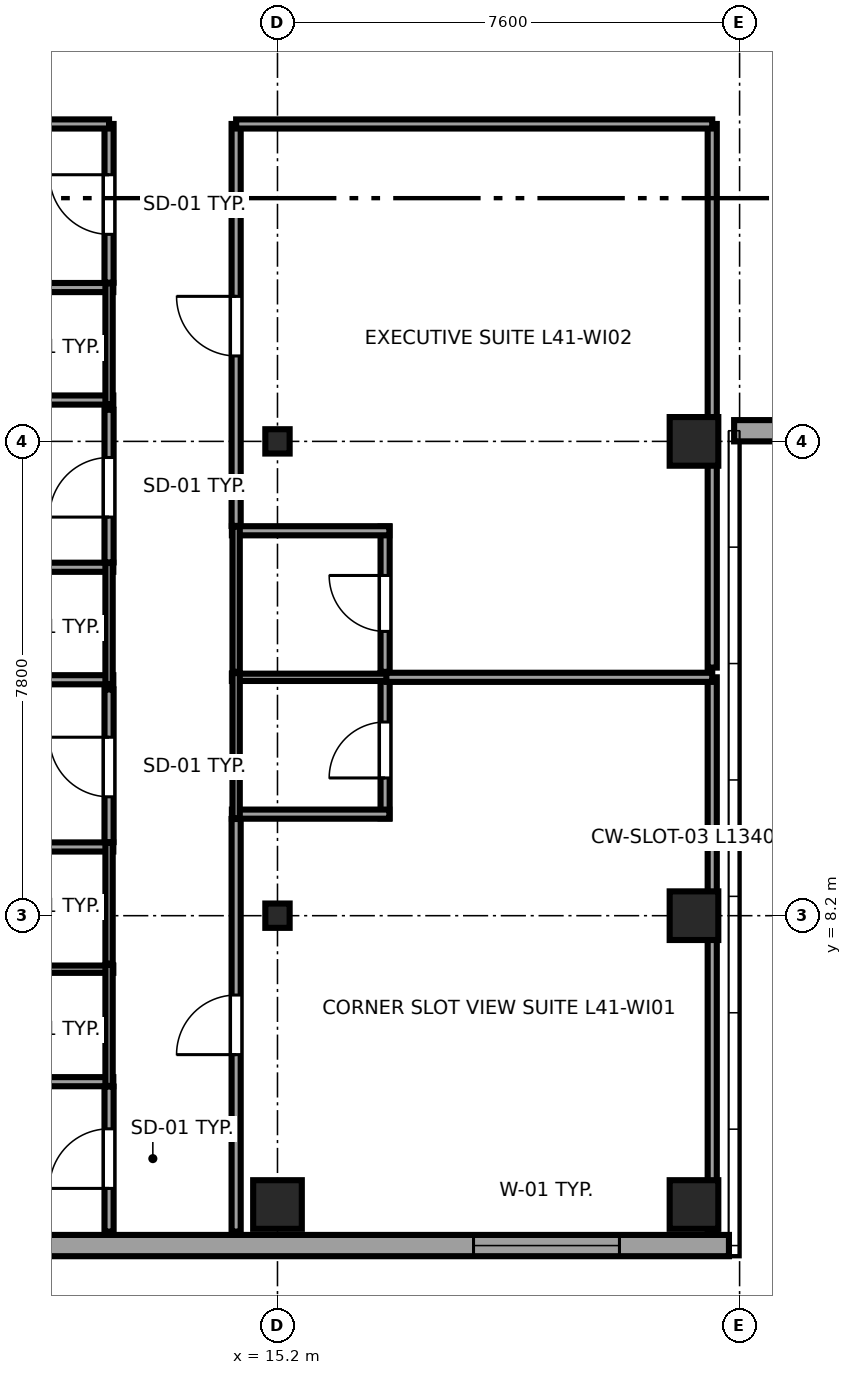
"""IFC4 building model, lengths in metres.
Left out: names, types, materials, properties, quantities, classifications, styles, units other than length and angle.
Written with IfcOpenShell. Run it as: python <this file> out.ifc"""

import sys

from ifc_helpers import new_model, si_unit, direction, frame, frame_2d, origin, origin_2d, place, context, subcontext, project, spatial, rectangle, i_section, extrude, source, transform, mapped, element, fill, save


model = new_model("IFC4")
c1 = context("Model", 3, precision=1e-05, world=origin(), true_north=direction((0.0, 1.0)))
c2 = subcontext(c1, "Body", "Model", "MODEL_VIEW")
j1 = project(units=[si_unit("LENGTHUNIT", "METRE"), si_unit("PLANEANGLEUNIT", "RADIAN")], contexts=[c1])
p1 = place(None, origin())
s1 = spatial("IfcSite", under=j1, at=p1, CompositionType="ELEMENT")
p2 = place(p1, origin())
s2 = spatial("IfcBuilding", under=s1, at=p2, CompositionType="ELEMENT")
p3 = place(p2, frame((0.0, 0.0, 157.7)))
s3 = spatial("IfcBuildingStorey", under=s2, at=p3, CompositionType="ELEMENT", Elevation=157.7)
m1 = source(origin(), c2, "Body", "SweptSolid", [
    extrude(rectangle(XDim=0.8, YDim=0.8, at=origin_2d()), origin(), (0.0, 0.0, 1.0), 3.55),
])
p4 = place(p3, frame((15.2, 3.45, 0.0), z_axis=(0.0, 0.0, 1.0), x_axis=(1.0, 0.0, 0.0)))
e1 = element("IfcColumn", 1, at=p4, inside=s3, PredefinedType="COLUMN", context=c2, shape_type="MappedRepresentation", body=[
    mapped(m1, transform((0.0, 0.0, 0.0), x_axis=(1.0, 0.0, 0.0), y_axis=(0.0, 1.0, 0.0), z_axis=(0.0, 0.0, 1.0), scale=1.0)),
])
m2 = source(origin(), c2, "Body", "SweptSolid", [
    extrude(i_section(OverallWidth=0.4, OverallDepth=0.4, WebThickness=0.02, FlangeThickness=0.035, at=origin_2d()), origin(), (0.0, 0.0, 1.0), 3.55),
])
for number, where, z_axis, x_axis in (
    (2, (15.2, 8.2, 0.0), (0.0, 0.0, 1.0), (1.0, 0.0, 0.0)),
    (3, (15.2, 16.0, 0.0), (0.0, 0.0, 1.0), (1.0, 0.0, 0.0)),
):
    element("IfcColumn", number, at=place(p3, frame(where, z_axis=z_axis, x_axis=x_axis)), inside=s3, PredefinedType="COLUMN", context=c2, shape_type="MappedRepresentation", body=[
        mapped(m2, transform((0.0, 0.0, 0.0), x_axis=(1.0, 0.0, 0.0), y_axis=(0.0, 1.0, 0.0), z_axis=(0.0, 0.0, 1.0), scale=1.0)),
    ])
for number, where, z_axis, x_axis in (
    (4, (22.05, 3.45, 0.0), (0.0, 0.0, 1.0), (1.0, 0.0, 0.0)),
    (5, (22.05, 8.2, 0.0), (0.0, 0.0, 1.0), (1.0, 0.0, 0.0)),
    (6, (22.05, 16.0, 0.0), (0.0, 0.0, 1.0), (1.0, 0.0, 0.0)),
):
    element("IfcColumn", number, at=place(p3, frame(where, z_axis=z_axis, x_axis=x_axis)), inside=s3, PredefinedType="COLUMN", context=c2, shape_type="MappedRepresentation", body=[
        mapped(m1, transform((0.0, 0.0, 0.0), x_axis=(1.0, 0.0, 0.0), y_axis=(0.0, 1.0, 0.0), z_axis=(0.0, 0.0, 1.0), scale=1.0)),
    ])
p5 = place(p3, frame((7.017, 2.775, 0.0), z_axis=(0.0, 0.0, 1.0), x_axis=(1.0, 0.0, 0.0)))
e7 = element("IfcWall", 7, at=p5, inside=s3, PredefinedType="SOLIDWALL", context=c2, shape_type="SweptSolid", body=[
    extrude(rectangle(XDim=15.608, YDim=0.35, at=frame_2d((7.804, 0.0))), origin(), (0.0, 0.0, 1.0), 3.37),
])
p6 = place(p5, frame((1.801, 0.0, 0.68)))
e8 = element("IfcOpeningElement", 8, at=p6, cuts=e7, PredefinedType="OPENING", context=c2, shape_type="SweptSolid", body=[
    extrude(rectangle(XDim=2.4, YDim=1.9, at=frame_2d((1.2, 0.95))), frame((0.0, 0.185, 0.0), z_axis=(0.0, -1.0, 0.0), x_axis=(1.0, 0.0, 0.0)), (0.0, 0.0, 1.0), 0.37),
])
p7 = place(p5, frame((11.407, 0.0, 0.68)))
e9 = element("IfcOpeningElement", 9, at=p7, cuts=e7, PredefinedType="OPENING", context=c2, shape_type="SweptSolid", body=[
    extrude(rectangle(XDim=2.4, YDim=1.9, at=frame_2d((1.2, 0.95))), frame((0.0, 0.185, 0.0), z_axis=(0.0, -1.0, 0.0), x_axis=(1.0, 0.0, 0.0)), (0.0, 0.0, 1.0), 0.37),
])
p8 = place(p3, frame((22.71, 16.175, 0.0), z_axis=(0.0, 0.0, 1.0), x_axis=(1.0, 0.0, 0.0)))
e10 = element("IfcWall", 10, at=p8, inside=s3, PredefinedType="SOLIDWALL", context=c2, shape_type="SweptSolid", body=[
    extrude(rectangle(XDim=11.58, YDim=0.35, at=frame_2d((5.79, 0.0))), origin(), (0.0, 0.0, 1.0), 2.758),
])
p9 = place(p8, frame((1.995, 0.0, 0.68)))
e11 = element("IfcOpeningElement", 11, at=p9, cuts=e10, PredefinedType="OPENING", context=c2, shape_type="SweptSolid", body=[
    extrude(rectangle(XDim=2.4, YDim=1.9, at=frame_2d((1.2, 0.95))), frame((0.0, 0.185, 0.0), z_axis=(0.0, -1.0, 0.0), x_axis=(1.0, 0.0, 0.0)), (0.0, 0.0, 1.0), 0.37),
])
p10 = place(p8, frame((7.185, 0.0, 0.68)))
e12 = element("IfcOpeningElement", 12, at=p10, cuts=e10, PredefinedType="OPENING", context=c2, shape_type="SweptSolid", body=[
    extrude(rectangle(XDim=2.4, YDim=1.9, at=frame_2d((1.2, 0.95))), frame((0.0, 0.185, 0.0), z_axis=(0.0, -1.0, 0.0), x_axis=(1.0, 0.0, 0.0)), (0.0, 0.0, 1.0), 0.37),
])
p11 = place(p3, frame((9.91, 5.47, 0.0), z_axis=(0.0, 0.0, 1.0), x_axis=(1.0, 0.0, 0.0)))
e13 = element("IfcWall", 13, at=p11, inside=s3, PredefinedType="PARTITIONING", context=c2, shape_type="SweptSolid", body=[
    extrude(rectangle(XDim=2.59, YDim=0.15, at=frame_2d((1.295, 0.0))), origin(), (0.0, 0.0, 1.0), 3.37),
])
p12 = place(p3, frame((9.91, 7.32, 0.0), z_axis=(0.0, 0.0, 1.0), x_axis=(1.0, 0.0, 0.0)))
e14 = element("IfcWall", 14, at=p12, inside=s3, PredefinedType="PLUMBINGWALL", context=c2, shape_type="SweptSolid", body=[
    extrude(rectangle(XDim=2.59, YDim=0.12, at=frame_2d((1.295, 0.0))), origin(), (0.0, 0.0, 1.0), 3.37),
])
p13 = place(p3, frame((12.43, 5.4, 0.0), z_axis=(0.0, 0.0, 1.0), x_axis=(0.0, 1.0, 0.0)))
e15 = element("IfcWall", 15, at=p13, inside=s3, PredefinedType="PLUMBINGWALL", context=c2, shape_type="SweptSolid", body=[
    extrude(rectangle(XDim=1.99, YDim=0.12, at=frame_2d((0.995, 0.0))), origin(), (0.0, 0.0, 1.0), 3.37),
])
p14 = place(p3, frame((9.91, 9.33, 0.0), z_axis=(0.0, 0.0, 1.0), x_axis=(1.0, 0.0, 0.0)))
e16 = element("IfcWall", 16, at=p14, inside=s3, PredefinedType="PARTITIONING", context=c2, shape_type="SweptSolid", body=[
    extrude(rectangle(XDim=2.59, YDim=0.15, at=frame_2d((1.295, 0.0))), origin(), (0.0, 0.0, 1.0), 3.37),
])
p15 = place(p3, frame((12.43, 7.41, 0.0), z_axis=(0.0, 0.0, 1.0), x_axis=(0.0, 1.0, 0.0)))
e17 = element("IfcWall", 17, at=p15, inside=s3, PredefinedType="PLUMBINGWALL", context=c2, shape_type="SweptSolid", body=[
    extrude(rectangle(XDim=1.99, YDim=0.12, at=frame_2d((0.995, 0.0))), origin(), (0.0, 0.0, 1.0), 3.37),
])
p16 = place(p3, frame((2.9, 12.08, 0.0), z_axis=(0.0, 0.0, 1.0), x_axis=(1.0, 0.0, 0.0)))
e18 = element("IfcWall", 18, at=p16, inside=s3, PredefinedType="PARTITIONING", context=c2, shape_type="SweptSolid", body=[
    extrude(rectangle(XDim=9.6, YDim=0.15, at=frame_2d((4.8, 0.0))), origin(), (0.0, 0.0, 1.0), 3.37),
])
p17 = place(p3, frame((9.91, 13.93, 0.0), z_axis=(0.0, 0.0, 1.0), x_axis=(1.0, 0.0, 0.0)))
e19 = element("IfcWall", 19, at=p17, inside=s3, PredefinedType="PARTITIONING", context=c2, shape_type="SweptSolid", body=[
    extrude(rectangle(XDim=2.59, YDim=0.15, at=frame_2d((1.295, 0.0))), origin(), (0.0, 0.0, 1.0), 3.37),
])
p18 = place(p3, frame((12.43, 12.01, 0.0), z_axis=(0.0, 0.0, 1.0), x_axis=(0.0, 1.0, 0.0)))
e20 = element("IfcWall", 20, at=p18, inside=s3, PredefinedType="PLUMBINGWALL", context=c2, shape_type="SweptSolid", body=[
    extrude(rectangle(XDim=1.99, YDim=0.12, at=frame_2d((0.995, 0.0))), origin(), (0.0, 0.0, 1.0), 3.37),
])
p19 = place(p3, frame((2.9, 16.68, 0.0), z_axis=(0.0, 0.0, 1.0), x_axis=(1.0, 0.0, 0.0)))
e21 = element("IfcWall", 21, at=p19, inside=s3, PredefinedType="PARTITIONING", context=c2, shape_type="SweptSolid", body=[
    extrude(rectangle(XDim=9.6, YDim=0.15, at=frame_2d((4.8, 0.0))), origin(), (0.0, 0.0, 1.0), 3.37),
])
p20 = place(p3, frame((9.91, 18.53, 0.0), z_axis=(0.0, 0.0, 1.0), x_axis=(1.0, 0.0, 0.0)))
e22 = element("IfcWall", 22, at=p20, inside=s3, PredefinedType="PARTITIONING", context=c2, shape_type="SweptSolid", body=[
    extrude(rectangle(XDim=2.59, YDim=0.15, at=frame_2d((1.295, 0.0))), origin(), (0.0, 0.0, 1.0), 3.37),
])
p21 = place(p3, frame((12.43, 16.61, 0.0), z_axis=(0.0, 0.0, 1.0), x_axis=(0.0, 1.0, 0.0)))
e23 = element("IfcWall", 23, at=p21, inside=s3, PredefinedType="PLUMBINGWALL", context=c2, shape_type="SweptSolid", body=[
    extrude(rectangle(XDim=1.99, YDim=0.12, at=frame_2d((0.995, 0.0))), origin(), (0.0, 0.0, 1.0), 3.37),
])
p22 = place(p3, frame((16.97, 9.8, 0.0), z_axis=(0.0, 0.0, 1.0), x_axis=(0.0, 1.0, 0.0)))
e24 = element("IfcWall", 24, at=p22, inside=s3, PredefinedType="PARTITIONING", context=c2, shape_type="SweptSolid", body=[
    extrude(rectangle(XDim=2.39, YDim=0.15, at=frame_2d((1.195, 0.0))), origin(), (0.0, 0.0, 1.0), 3.37),
])
p23 = place(p22, frame((0.665, 0.0, 0.0)))
e25 = element("IfcOpeningElement", 25, at=p23, cuts=e24, PredefinedType="OPENING", context=c2, shape_type="SweptSolid", body=[
    extrude(rectangle(XDim=0.92, YDim=2.01, at=frame_2d((0.46, 1.005))), frame((0.0, 0.085, 0.0), z_axis=(0.0, -1.0, 0.0), x_axis=(1.0, 0.0, 0.0)), (0.0, 0.0, 1.0), 0.17),
])
p24 = place(p3, frame((14.45, 9.87, 0.0), z_axis=(0.0, 0.0, 1.0), x_axis=(1.0, 0.0, 0.0)))
e26 = element("IfcWall", 26, at=p24, inside=s3, PredefinedType="PARTITIONING", context=c2, shape_type="SweptSolid", body=[
    extrude(rectangle(XDim=2.59, YDim=0.15, at=frame_2d((1.295, 0.0))), origin(), (0.0, 0.0, 1.0), 3.37),
])
p25 = place(p3, frame((14.45, 12.12, 0.0), z_axis=(0.0, 0.0, 1.0), x_axis=(1.0, 0.0, 0.0)))
e27 = element("IfcWall", 27, at=p25, inside=s3, PredefinedType="PLUMBINGWALL", context=c2, shape_type="SweptSolid", body=[
    extrude(rectangle(XDim=2.59, YDim=0.12, at=frame_2d((1.295, 0.0))), origin(), (0.0, 0.0, 1.0), 3.37),
])
p26 = place(p3, frame((14.52, 9.8, 0.0), z_axis=(0.0, 0.0, 1.0), x_axis=(0.0, 1.0, 0.0)))
e28 = element("IfcWall", 28, at=p26, inside=s3, PredefinedType="PLUMBINGWALL", context=c2, shape_type="SweptSolid", body=[
    extrude(rectangle(XDim=2.39, YDim=0.12, at=frame_2d((1.195, 0.0))), origin(), (0.0, 0.0, 1.0), 3.37),
])
p27 = place(p3, frame((16.97, 12.21, 0.0), z_axis=(0.0, 0.0, 1.0), x_axis=(0.0, 1.0, 0.0)))
e29 = element("IfcWall", 29, at=p27, inside=s3, PredefinedType="PARTITIONING", context=c2, shape_type="SweptSolid", body=[
    extrude(rectangle(XDim=2.39, YDim=0.15, at=frame_2d((1.195, 0.0))), origin(), (0.0, 0.0, 1.0), 3.37),
])
p28 = place(p27, frame((0.665, 0.0, 0.0)))
e30 = element("IfcOpeningElement", 30, at=p28, cuts=e29, PredefinedType="OPENING", context=c2, shape_type="SweptSolid", body=[
    extrude(rectangle(XDim=0.92, YDim=2.01, at=frame_2d((0.46, 1.005))), frame((0.0, 0.085, 0.0), z_axis=(0.0, -1.0, 0.0), x_axis=(1.0, 0.0, 0.0)), (0.0, 0.0, 1.0), 0.17),
])
p29 = place(p3, frame((14.45, 14.53, 0.0), z_axis=(0.0, 0.0, 1.0), x_axis=(1.0, 0.0, 0.0)))
e31 = element("IfcWall", 31, at=p29, inside=s3, PredefinedType="PARTITIONING", context=c2, shape_type="SweptSolid", body=[
    extrude(rectangle(XDim=2.59, YDim=0.15, at=frame_2d((1.295, 0.0))), origin(), (0.0, 0.0, 1.0), 3.37),
])
p30 = place(p3, frame((14.52, 12.21, 0.0), z_axis=(0.0, 0.0, 1.0), x_axis=(0.0, 1.0, 0.0)))
e32 = element("IfcWall", 32, at=p30, inside=s3, PredefinedType="PLUMBINGWALL", context=c2, shape_type="SweptSolid", body=[
    extrude(rectangle(XDim=2.39, YDim=0.12, at=frame_2d((1.195, 0.0))), origin(), (0.0, 0.0, 1.0), 3.37),
])
p31 = place(p3, frame((12.43, 3.005, 0.0), z_axis=(0.0, 0.0, 1.0), x_axis=(0.0, 1.0, 0.0)))
e33 = element("IfcWall", 33, at=p31, inside=s3, PredefinedType="PARTITIONING", context=c2, shape_type="SweptSolid", body=[
    extrude(rectangle(XDim=2.385, YDim=0.15, at=frame_2d((1.192, 0.0))), origin(), (0.0, 0.0, 1.0), 3.37),
])
p32 = place(p31, frame((0.71, 0.0, 0.0)))
e34 = element("IfcOpeningElement", 34, at=p32, cuts=e33, PredefinedType="OPENING", context=c2, shape_type="SweptSolid", body=[
    extrude(rectangle(XDim=0.98, YDim=2.12, at=frame_2d((0.49, 1.06))), frame((0.0, 0.085, 0.0), z_axis=(0.0, -1.0, 0.0), x_axis=(1.0, 0.0, 0.0)), (0.0, 0.0, 1.0), 0.17),
])
p33 = place(p3, frame((12.43, 9.41, 0.0), z_axis=(0.0, 0.0, 1.0), x_axis=(0.0, 1.0, 0.0)))
e35 = element("IfcWall", 35, at=p33, inside=s3, PredefinedType="PARTITIONING", context=c2, shape_type="SweptSolid", body=[
    extrude(rectangle(XDim=2.51, YDim=0.15, at=frame_2d((1.255, 0.0))), origin(), (0.0, 0.0, 1.0), 3.37),
])
p34 = place(p33, frame((0.745, 0.0, 0.0)))
e36 = element("IfcOpeningElement", 36, at=p34, cuts=e35, PredefinedType="OPENING", context=c2, shape_type="SweptSolid", body=[
    extrude(rectangle(XDim=0.98, YDim=2.12, at=frame_2d((0.49, 1.06))), frame((0.0, 0.085, 0.0), z_axis=(0.0, -1.0, 0.0), x_axis=(1.0, 0.0, 0.0)), (0.0, 0.0, 1.0), 0.17),
])
p35 = place(p3, frame((12.43, 14.01, 0.0), z_axis=(0.0, 0.0, 1.0), x_axis=(0.0, 1.0, 0.0)))
e37 = element("IfcWall", 37, at=p35, inside=s3, PredefinedType="PARTITIONING", context=c2, shape_type="SweptSolid", body=[
    extrude(rectangle(XDim=2.51, YDim=0.15, at=frame_2d((1.255, 0.0))), origin(), (0.0, 0.0, 1.0), 3.37),
])
p36 = place(p35, frame((0.745, 0.0, 0.0)))
e38 = element("IfcOpeningElement", 38, at=p36, cuts=e37, PredefinedType="OPENING", context=c2, shape_type="SweptSolid", body=[
    extrude(rectangle(XDim=0.98, YDim=2.12, at=frame_2d((0.49, 1.06))), frame((0.0, 0.085, 0.0), z_axis=(0.0, -1.0, 0.0), x_axis=(1.0, 0.0, 0.0)), (0.0, 0.0, 1.0), 0.17),
])
p37 = place(p3, frame((12.43, 18.61, 0.0), z_axis=(0.0, 0.0, 1.0), x_axis=(0.0, 1.0, 0.0)))
e39 = element("IfcWall", 39, at=p37, inside=s3, PredefinedType="PARTITIONING", context=c2, shape_type="SweptSolid", body=[
    extrude(rectangle(XDim=2.61, YDim=0.15, at=frame_2d((1.305, 0.0))), origin(), (0.0, 0.0, 1.0), 3.37),
])
p38 = place(p37, frame((0.795, 0.0, 0.0)))
e40 = element("IfcOpeningElement", 40, at=p38, cuts=e39, PredefinedType="OPENING", context=c2, shape_type="SweptSolid", body=[
    extrude(rectangle(XDim=0.98, YDim=2.12, at=frame_2d((0.49, 1.06))), frame((0.0, 0.085, 0.0), z_axis=(0.0, -1.0, 0.0), x_axis=(1.0, 0.0, 0.0)), (0.0, 0.0, 1.0), 0.17),
])
p39 = place(p3, frame((2.9, 21.22, 0.0), z_axis=(0.0, 0.0, 1.0), x_axis=(1.0, 0.0, 0.0)))
e41 = element("IfcWall", 41, at=p39, inside=s3, PredefinedType="PARTITIONING", context=c2, shape_type="SweptSolid", body=[
    extrude(rectangle(XDim=9.53, YDim=0.15, at=frame_2d((4.765, 0.0))), origin(), (0.0, 0.0, 1.0), 3.37),
])
p40 = place(p3, frame((14.52, 3.005, 0.0), z_axis=(0.0, 0.0, 1.0), x_axis=(0.0, 1.0, 0.0)))
e42 = element("IfcWall", 42, at=p40, inside=s3, PredefinedType="PARTITIONING", context=c2, shape_type="SweptSolid", body=[
    extrude(rectangle(XDim=6.785, YDim=0.15, at=frame_2d((3.393, 0.0))), origin(), (0.0, 0.0, 1.0), 3.37),
])
p41 = place(p40, frame((2.91, 0.0, 0.0)))
e43 = element("IfcOpeningElement", 43, at=p41, cuts=e42, PredefinedType="OPENING", context=c2, shape_type="SweptSolid", body=[
    extrude(rectangle(XDim=0.98, YDim=2.12, at=frame_2d((0.49, 1.06))), frame((0.0, 0.085, 0.0), z_axis=(0.0, -1.0, 0.0), x_axis=(1.0, 0.0, 0.0)), (0.0, 0.0, 1.0), 0.17),
])
p42 = place(p3, frame((22.35, 3.005, 0.0), z_axis=(0.0, 0.0, 1.0), x_axis=(0.0, 1.0, 0.0)))
e44 = element("IfcWall", 44, at=p42, inside=s3, PredefinedType="PARTITIONING", context=c2, shape_type="SweptSolid", body=[
    extrude(rectangle(XDim=9.115, YDim=0.15, at=frame_2d((4.558, 0.0))), origin(), (0.0, 0.0, 1.0), 3.37),
])
p43 = place(p3, frame((16.99, 12.12, 0.0), z_axis=(0.0, 0.0, 1.0), x_axis=(1.0, 0.0, 0.0)))
e45 = element("IfcWall", 45, at=p43, inside=s3, PredefinedType="PARTITIONING", context=c2, shape_type="SweptSolid", body=[
    extrude(rectangle(XDim=5.36, YDim=0.15, at=frame_2d((2.68, 0.0))), origin(), (0.0, 0.0, 1.0), 3.37),
])
p44 = place(p3, frame((14.52, 14.61, 0.0), z_axis=(0.0, 0.0, 1.0), x_axis=(0.0, 1.0, 0.0)))
e46 = element("IfcWall", 46, at=p44, inside=s3, PredefinedType="PARTITIONING", context=c2, shape_type="SweptSolid", body=[
    extrude(rectangle(XDim=6.61, YDim=0.15, at=frame_2d((3.305, 0.0))), origin(), (0.0, 0.0, 1.0), 3.37),
])
p45 = place(p44, frame((2.795, 0.0, 0.0)))
e47 = element("IfcOpeningElement", 47, at=p45, cuts=e46, PredefinedType="OPENING", context=c2, shape_type="SweptSolid", body=[
    extrude(rectangle(XDim=0.98, YDim=2.12, at=frame_2d((0.49, 1.06))), frame((0.0, 0.085, 0.0), z_axis=(0.0, -1.0, 0.0), x_axis=(1.0, 0.0, 0.0)), (0.0, 0.0, 1.0), 0.17),
])
p46 = place(p3, frame((22.35, 12.28, 0.0), z_axis=(0.0, 0.0, 1.0), x_axis=(0.0, 1.0, 0.0)))
e48 = element("IfcWall", 48, at=p46, inside=s3, PredefinedType="PARTITIONING", context=c2, shape_type="SweptSolid", body=[
    extrude(rectangle(XDim=8.94, YDim=0.15, at=frame_2d((4.47, 0.0))), origin(), (0.0, 0.0, 1.0), 3.37),
])
p47 = place(p3, frame((14.52, 21.22, 0.0), z_axis=(0.0, 0.0, 1.0), x_axis=(1.0, 0.0, 0.0)))
e49 = element("IfcWall", 49, at=p47, inside=s3, PredefinedType="PARTITIONING", context=c2, shape_type="SweptSolid", body=[
    extrude(rectangle(XDim=7.83, YDim=0.15, at=frame_2d((3.915, 0.0))), origin(), (0.0, 0.0, 1.0), 3.37),
])
m3 = source(origin(), c2, "Body", "SweptSolid", [
    extrude(rectangle(XDim=2.4, YDim=1.9, at=frame_2d((1.2, 0.95))), frame((0.0, 0.09, 0.0), z_axis=(0.0, -1.0, 0.0), x_axis=(1.0, 0.0, 0.0)), (0.0, 0.0, 1.0), 0.06),
])
p48 = place(p7, origin())
e50 = element("IfcWindow", 50, at=p48, inside=s3, PartitioningType="TRIPLE_PANEL_HORIZONTAL", PredefinedType="WINDOW", context=c2, shape_type="MappedRepresentation", body=[
    mapped(m3, transform((0.0, 0.0, 0.0), x_axis=(1.0, 0.0, 0.0), y_axis=(0.0, 1.0, 0.0), z_axis=(0.0, 0.0, 1.0), scale=1.0)),
])
fill(e9, e50)
m4 = source(origin(), c2, "Body", "SweptSolid", [
    extrude(rectangle(XDim=0.92, YDim=2.01, at=frame_2d((0.46, 1.005))), frame((0.0, 0.025, 0.0), z_axis=(0.0, -1.0, 0.0), x_axis=(1.0, 0.0, 0.0)), (0.0, 0.0, 1.0), 0.05),
])
p49 = place(p23, origin())
e51 = element("IfcDoor", 51, at=p49, inside=s3, OperationType="SINGLE_SWING_LEFT", PredefinedType="DOOR", context=c2, shape_type="MappedRepresentation", body=[
    mapped(m4, transform((0.0, 0.0, 0.0), x_axis=(1.0, 0.0, 0.0), y_axis=(0.0, 1.0, 0.0), z_axis=(0.0, 0.0, 1.0), scale=1.0)),
])
fill(e25, e51)
p50 = place(p28, origin())
e52 = element("IfcDoor", 52, at=p50, inside=s3, OperationType="SINGLE_SWING_RIGHT", PredefinedType="DOOR", context=c2, shape_type="MappedRepresentation", body=[
    mapped(m4, transform((0.0, 0.0, 0.0), x_axis=(1.0, 0.0, 0.0), y_axis=(0.0, 1.0, 0.0), z_axis=(0.0, 0.0, 1.0), scale=1.0)),
])
fill(e30, e52)
m5 = source(origin(), c2, "Body", "SweptSolid", [
    extrude(rectangle(XDim=0.98, YDim=2.12, at=frame_2d((0.49, 1.06))), frame((0.0, 0.025, 0.0), z_axis=(0.0, -1.0, 0.0), x_axis=(1.0, 0.0, 0.0)), (0.0, 0.0, 1.0), 0.05),
])
p51 = place(p32, origin())
e53 = element("IfcDoor", 53, at=p51, inside=s3, OperationType="SINGLE_SWING_LEFT", PredefinedType="DOOR", context=c2, shape_type="MappedRepresentation", body=[
    mapped(m5, transform((0.0, 0.0, 0.0), x_axis=(1.0, 0.0, 0.0), y_axis=(0.0, 1.0, 0.0), z_axis=(0.0, 0.0, 1.0), scale=1.0)),
])
fill(e34, e53)
p52 = place(p34, origin())
e54 = element("IfcDoor", 54, at=p52, inside=s3, OperationType="SINGLE_SWING_RIGHT", PredefinedType="DOOR", context=c2, shape_type="MappedRepresentation", body=[
    mapped(m5, transform((0.0, 0.0, 0.0), x_axis=(1.0, 0.0, 0.0), y_axis=(0.0, 1.0, 0.0), z_axis=(0.0, 0.0, 1.0), scale=1.0)),
])
fill(e36, e54)
p53 = place(p36, origin())
e55 = element("IfcDoor", 55, at=p53, inside=s3, OperationType="SINGLE_SWING_LEFT", PredefinedType="DOOR", context=c2, shape_type="MappedRepresentation", body=[
    mapped(m5, transform((0.0, 0.0, 0.0), x_axis=(1.0, 0.0, 0.0), y_axis=(0.0, 1.0, 0.0), z_axis=(0.0, 0.0, 1.0), scale=1.0)),
])
fill(e38, e55)
p54 = place(p38, origin())
e56 = element("IfcDoor", 56, at=p54, inside=s3, OperationType="SINGLE_SWING_RIGHT", PredefinedType="DOOR", context=c2, shape_type="MappedRepresentation", body=[
    mapped(m5, transform((0.0, 0.0, 0.0), x_axis=(1.0, 0.0, 0.0), y_axis=(0.0, 1.0, 0.0), z_axis=(0.0, 0.0, 1.0), scale=1.0)),
])
fill(e40, e56)
p55 = place(p41, origin())
e57 = element("IfcDoor", 57, at=p55, inside=s3, OperationType="SINGLE_SWING_LEFT", PredefinedType="DOOR", context=c2, shape_type="MappedRepresentation", body=[
    mapped(m5, transform((0.0, 0.0, 0.0), x_axis=(1.0, 0.0, 0.0), y_axis=(0.0, 1.0, 0.0), z_axis=(0.0, 0.0, 1.0), scale=1.0)),
])
fill(e43, e57)
p56 = place(p45, origin())
e58 = element("IfcDoor", 58, at=p56, inside=s3, OperationType="SINGLE_SWING_RIGHT", PredefinedType="DOOR", context=c2, shape_type="MappedRepresentation", body=[
    mapped(m5, transform((0.0, 0.0, 0.0), x_axis=(1.0, 0.0, 0.0), y_axis=(0.0, 1.0, 0.0), z_axis=(0.0, 0.0, 1.0), scale=1.0)),
])
fill(e47, e58)
save(model, sys.argv[1])
